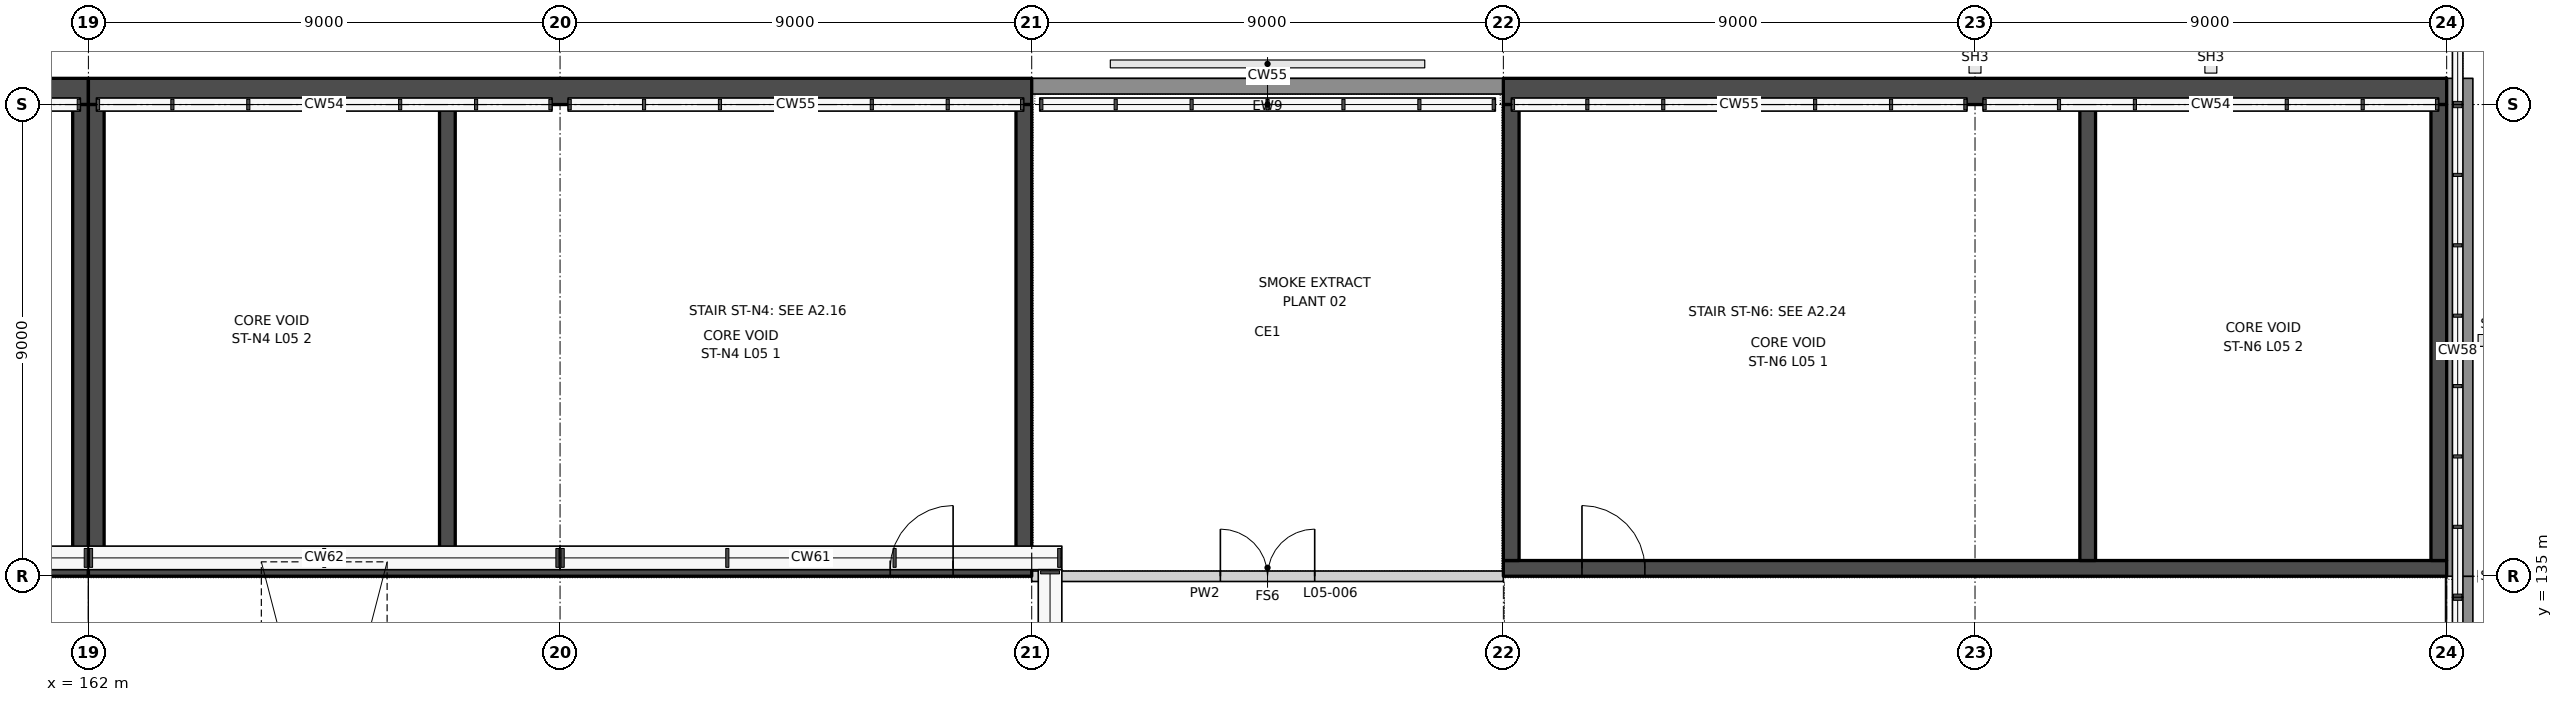
"""IFC4 building model, lengths in metres.
Left out: names, types, materials, properties, quantities, classifications, styles, units other than length and angle.
Written with IfcOpenShell. Run it as: python <this file> out.ifc"""

import sys

from ifc_helpers import new_model, si_unit, direction, frame, frame_2d, origin, place, context, subcontext, project, spatial, polyline, rectangle, outline, extrude, element, fill, save


model = new_model("IFC4")
c1 = context("Model", 3, precision=1e-05, world=origin(), true_north=direction((0.0, 1.0)))
c2 = subcontext(c1, "Body", "Model", "MODEL_VIEW")
j1 = project(units=[si_unit("LENGTHUNIT", "METRE"), si_unit("PLANEANGLEUNIT", "RADIAN")], contexts=[c1])
p1 = place(None, origin())
s1 = spatial("IfcSite", under=j1, at=p1, CompositionType="ELEMENT")
p2 = place(p1, origin())
s2 = spatial("IfcBuilding", under=s1, at=p2, CompositionType="ELEMENT")
p3 = place(p2, frame((0.0, 0.0, 33.5)))
s3 = spatial("IfcBuildingStorey", under=s2, at=p3, CompositionType="ELEMENT", Elevation=33.5)
p4 = place(p3, frame((180.0, 135.0, 0.0), z_axis=(0.0, 0.0, 1.0), x_axis=(1.0, 0.0, 0.0)))
e1 = element("IfcWall", 1, at=p4, inside=s3, PredefinedType="PARTITIONING", context=c2, shape_type="SweptSolid", body=[
    extrude(rectangle(XDim=9.0, YDim=0.2, at=frame_2d((4.5, 0.0))), origin(), (0.0, 0.0, 1.0), 4.0),
])
p5 = place(p4, frame((3.6, 0.0, 0.0)))
e2 = element("IfcOpeningElement", 2, at=p5, cuts=e1, PredefinedType="OPENING", context=c2, shape_type="SweptSolid", body=[
    extrude(rectangle(XDim=1.8, YDim=2.1, at=frame_2d((0.9, 1.05))), frame((0.0, 0.11, 0.0), z_axis=(0.0, -1.0, 0.0), x_axis=(1.0, 0.0, 0.0)), (0.0, 0.0, 1.0), 0.22),
])
p6 = place(p3, frame((207.35, 126.4, 0.0), z_axis=(0.0, 0.0, 1.0), x_axis=(0.0, 1.0, 0.0)))
e3 = element("IfcWall", 3, at=p6, inside=s3, PredefinedType="SOLIDWALL", context=c2, shape_type="SweptSolid", body=[
    extrude(rectangle(XDim=8.6, YDim=0.3, at=frame_2d((4.3, 0.0))), origin(), (0.0, 0.0, 1.0), 4.0),
])
p7 = place(p3, frame((207.25, 135.0, 0.0), z_axis=(0.0, 0.0, 1.0), x_axis=(0.0, 1.0, 0.0)))
e4 = element("IfcWall", 4, at=p7, inside=s3, PredefinedType="SOLIDWALL", context=c2, shape_type="SweptSolid", body=[
    extrude(rectangle(XDim=9.5, YDim=0.5, at=frame_2d((4.75, 0.0))), origin(), (0.0, 0.0, 1.0), 4.0),
])
p8 = place(p3, frame((189.0, 144.35, 0.0), z_axis=(0.0, 0.0, 1.0), x_axis=(-1.0, 0.0, 0.0)))
e5 = element("IfcWall", 5, at=p8, inside=s3, PredefinedType="SOLIDWALL", context=c2, shape_type="SweptSolid", body=[
    extrude(rectangle(XDim=9.0, YDim=0.3, at=frame_2d((4.5, 0.0))), origin(), (0.0, 0.0, 1.0), 4.0),
])
p9 = place(p3, frame((144.0, 135.15, 0.0), z_axis=(0.0, 0.0, 1.0), x_axis=(1.0, 0.0, 0.0)))
e6 = element("IfcWall", 6, at=p9, inside=s3, PredefinedType="SHEAR", context=c2, shape_type="SweptSolid", body=[
    extrude(rectangle(XDim=18.0, YDim=0.3, at=frame_2d((9.0, 0.0))), origin(), (0.0, 0.0, 1.0), 4.0),
])
p10 = place(p9, frame((8.6, 0.0, 0.0)))
e7 = element("IfcOpeningElement", 7, at=p10, cuts=e6, PredefinedType="OPENING", context=c2, shape_type="SweptSolid", body=[
    extrude(rectangle(XDim=1.2, YDim=2.1, at=frame_2d((0.6, 1.05))), frame((0.0, 0.16, 0.0), z_axis=(0.0, -1.0, 0.0), x_axis=(1.0, 0.0, 0.0)), (0.0, 0.0, 1.0), 0.32),
])
p11 = place(p3, frame((144.0, 144.25, 0.0), z_axis=(0.0, 0.0, 1.0), x_axis=(1.0, 0.0, 0.0)))
e8 = element("IfcWall", 8, at=p11, inside=s3, PredefinedType="SHEAR", context=c2, shape_type="SweptSolid", body=[
    extrude(rectangle(XDim=18.0, YDim=0.5, at=frame_2d((9.0, 0.0))), origin(), (0.0, 0.0, 1.0), 4.0),
])
p12 = place(p3, frame((161.85, 135.3, 0.0), z_axis=(0.0, 0.0, 1.0), x_axis=(0.0, 1.0, 0.0)))
e9 = element("IfcWall", 9, at=p12, inside=s3, PredefinedType="SHEAR", context=c2, shape_type="SweptSolid", body=[
    extrude(rectangle(XDim=8.7, YDim=0.3, at=frame_2d((4.35, 0.0))), origin(), (0.0, 0.0, 1.0), 4.0),
])
p13 = place(p3, frame((180.0, 135.15, 0.0), z_axis=(0.0, 0.0, 1.0), x_axis=(-1.0, 0.0, 0.0)))
e10 = element("IfcWall", 10, at=p13, inside=s3, PredefinedType="SHEAR", context=c2, shape_type="SweptSolid", body=[
    extrude(rectangle(XDim=18.0, YDim=0.3, at=frame_2d((9.0, 0.0))), origin(), (0.0, 0.0, 1.0), 4.0),
])
p14 = place(p13, frame((1.5, 0.0, 0.0)))
e11 = element("IfcOpeningElement", 11, at=p14, cuts=e10, PredefinedType="OPENING", context=c2, shape_type="SweptSolid", body=[
    extrude(rectangle(XDim=1.2, YDim=2.1, at=frame_2d((0.6, 1.05))), frame((0.0, 0.16, 0.0), z_axis=(0.0, -1.0, 0.0), x_axis=(1.0, 0.0, 0.0)), (0.0, 0.0, 1.0), 0.32),
])
p15 = place(p3, frame((180.0, 144.25, 0.0), z_axis=(0.0, 0.0, 1.0), x_axis=(-1.0, 0.0, 0.0)))
e12 = element("IfcWall", 12, at=p15, inside=s3, PredefinedType="SHEAR", context=c2, shape_type="SweptSolid", body=[
    extrude(rectangle(XDim=18.0, YDim=0.5, at=frame_2d((9.0, 0.0))), origin(), (0.0, 0.0, 1.0), 4.0),
])
for number, where, z_axis, x_axis in (
    (13, (179.85, 135.3, 0.0), (0.0, 0.0, 1.0), (0.0, 1.0, 0.0)),
    (14, (162.15, 135.3, 0.0), (0.0, 0.0, 1.0), (0.0, 1.0, 0.0)),
    (15, (168.85, 135.3, 0.0), (0.0, 0.0, 1.0), (0.0, 1.0, 0.0)),
):
    element("IfcWall", number, at=place(p3, frame(where, z_axis=z_axis, x_axis=x_axis)), inside=s3, PredefinedType="SHEAR", context=c2, shape_type="SweptSolid", body=[
        extrude(rectangle(XDim=8.7, YDim=0.3, at=frame_2d((4.35, 0.0))), origin(), (0.0, 0.0, 1.0), 4.0),
    ])
p16 = place(p3, frame((189.0, 135.15, 0.0), z_axis=(0.0, 0.0, 1.0), x_axis=(1.0, 0.0, 0.0)))
e16 = element("IfcWall", 16, at=p16, inside=s3, PredefinedType="SHEAR", context=c2, shape_type="SweptSolid", body=[
    extrude(rectangle(XDim=18.0, YDim=0.3, at=frame_2d((9.0, 0.0))), origin(), (0.0, 0.0, 1.0), 4.0),
])
p17 = place(p16, frame((1.5, 0.0, 0.0)))
e17 = element("IfcOpeningElement", 17, at=p17, cuts=e16, PredefinedType="OPENING", context=c2, shape_type="SweptSolid", body=[
    extrude(rectangle(XDim=1.2, YDim=2.1, at=frame_2d((0.6, 1.05))), frame((0.0, 0.16, 0.0), z_axis=(0.0, -1.0, 0.0), x_axis=(1.0, 0.0, 0.0)), (0.0, 0.0, 1.0), 0.32),
])
p18 = place(p3, frame((189.0, 144.25, 0.0), z_axis=(0.0, 0.0, 1.0), x_axis=(1.0, 0.0, 0.0)))
e18 = element("IfcWall", 18, at=p18, inside=s3, PredefinedType="SHEAR", context=c2, shape_type="SweptSolid", body=[
    extrude(rectangle(XDim=18.0, YDim=0.5, at=frame_2d((9.0, 0.0))), origin(), (0.0, 0.0, 1.0), 4.0),
])
for number, where, z_axis, x_axis in (
    (19, (189.15, 135.3, 0.0), (0.0, 0.0, 1.0), (0.0, 1.0, 0.0)),
    (20, (206.85, 135.3, 0.0), (0.0, 0.0, 1.0), (0.0, 1.0, 0.0)),
    (21, (200.15, 135.3, 0.0), (0.0, 0.0, 1.0), (0.0, 1.0, 0.0)),
):
    element("IfcWall", number, at=place(p3, frame(where, z_axis=z_axis, x_axis=x_axis)), inside=s3, PredefinedType="SHEAR", context=c2, shape_type="SweptSolid", body=[
        extrude(rectangle(XDim=8.7, YDim=0.3, at=frame_2d((4.35, 0.0))), origin(), (0.0, 0.0, 1.0), 4.0),
    ])
p19 = place(p5, origin())
e22 = element("IfcDoor", 22, at=p19, inside=s3, OperationType="DOUBLE_DOOR_DOUBLE_SWING", PredefinedType="DOOR", context=c2, shape_type="SweptSolid", body=[
    extrude(rectangle(XDim=1.8, YDim=2.1, at=frame_2d((0.9, 1.05))), frame((0.0, 0.025, 0.0), z_axis=(0.0, -1.0, 0.0), x_axis=(1.0, 0.0, 0.0)), (0.0, 0.0, 1.0), 0.05),
])
fill(e2, e22)
p20 = place(p14, frame((1.2, 0.0, 0.0), z_axis=(0.0, 0.0, 1.0), x_axis=(-1.0, 0.0, 0.0)))
e23 = element("IfcDoor", 23, at=p20, inside=s3, OperationType="SINGLE_SWING_RIGHT", PredefinedType="DOOR", context=c2, shape_type="SweptSolid", body=[
    extrude(rectangle(XDim=1.2, YDim=2.1, at=frame_2d((0.6, 1.05))), frame((0.0, 0.025, 0.0), z_axis=(0.0, -1.0, 0.0), x_axis=(1.0, 0.0, 0.0)), (0.0, 0.0, 1.0), 0.05),
])
fill(e11, e23)
p21 = place(p17, origin())
e24 = element("IfcDoor", 24, at=p21, inside=s3, OperationType="SINGLE_SWING_LEFT", PredefinedType="DOOR", context=c2, shape_type="SweptSolid", body=[
    extrude(rectangle(XDim=1.2, YDim=2.1, at=frame_2d((0.6, 1.05))), frame((0.0, 0.025, 0.0), z_axis=(0.0, -1.0, 0.0), x_axis=(1.0, 0.0, 0.0)), (0.0, 0.0, 1.0), 0.05),
])
fill(e17, e24)
p22 = place(p2, frame((0.0, 0.0, 47.1)))
p23 = place(p22, frame((135.045, 81.01, 13.05), z_axis=(0.0, 0.072032280133, 0.99740230129), x_axis=(1.0, 0.0, 0.0)))
p24 = place(p23, origin())
e25 = element("IfcWindow", 25, at=p24, inside=s3, PartitioningType="SINGLE_PANEL", PredefinedType="SKYLIGHT", context=c2, shape_type="SweptSolid", body=[
    extrude(outline(polyline([(30.255, 45.107), (32.655, 45.107), (32.655, 54.406), (30.255, 54.406), (30.255, 45.107)])), origin(), (0.0, 0.0, -1.0), 0.05),
])
save(model, sys.argv[1])
